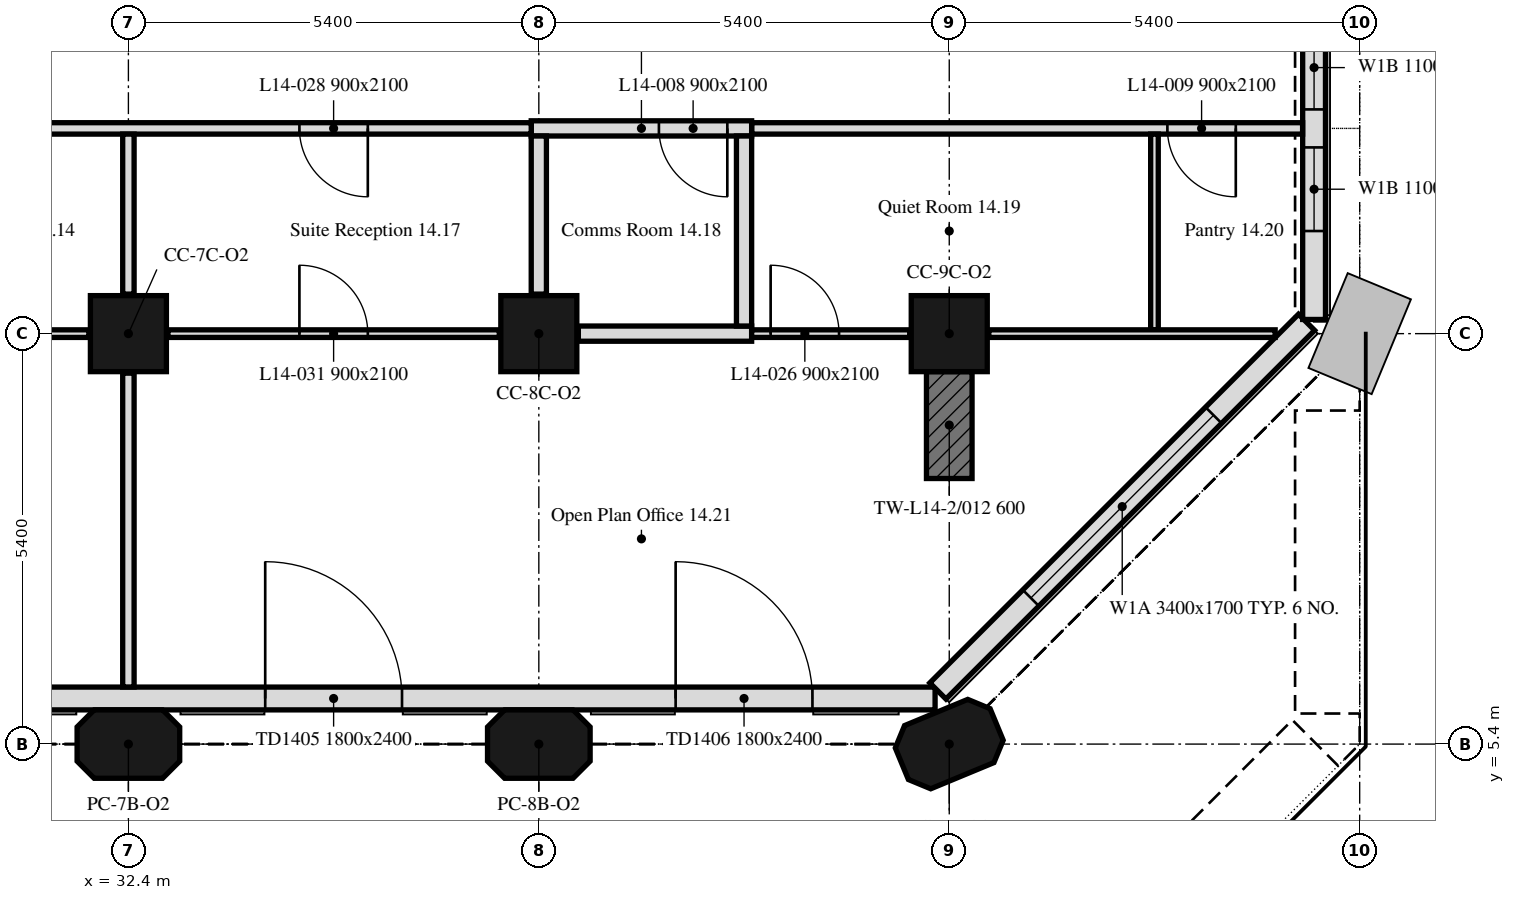
"""IFC4 building model, lengths in metres.
Left out: names, types, materials, properties, quantities, classifications, styles, units other than length and angle.
Written with IfcOpenShell. Run it as: python <this file> out.ifc"""

import sys

from ifc_helpers import new_model, si_unit, direction, frame, frame_2d, origin, origin_2d, place, context, subcontext, project, spatial, polyline, rectangle, outline, extrude, element, fill, save


model = new_model("IFC4")
c1 = context("Model", 3, precision=1e-05, world=origin(), true_north=direction((0.0, 1.0)))
c2 = subcontext(c1, "Body", "Model", "MODEL_VIEW")
j1 = project(units=[si_unit("LENGTHUNIT", "METRE"), si_unit("PLANEANGLEUNIT", "RADIAN")], contexts=[c1])
p1 = place(None, origin())
s1 = spatial("IfcSite", under=j1, at=p1, CompositionType="ELEMENT")
p2 = place(p1, origin())
s2 = spatial("IfcBuilding", under=s1, at=p2, CompositionType="ELEMENT")
p3 = place(p2, frame((0.0, 0.0, 65.0)))
s3 = spatial("IfcBuildingStorey", under=s2, at=p3, CompositionType="ELEMENT", Elevation=65.0)
for number, where, z_axis, x_axis in (
    (1, (32.4, 5.4, 0.0), (0.0, 0.0, 1.0), (1.0, 0.0, 0.0)),
    (2, (37.8, 5.4, 0.0), (0.0, 0.0, 1.0), (1.0, 0.0, 0.0)),
    (3, (43.2, 5.4, 0.0), (0.0, 0.0, 1.0), (0.924, 0.383, 0.0)),
):
    element("IfcColumn", number, at=place(p3, frame(where, z_axis=z_axis, x_axis=x_axis)), inside=s3, PredefinedType="COLUMN", context=c2, shape_type="SweptSolid", body=[
        extrude(outline(polyline([(-0.45, -0.45), (0.45, -0.45), (0.675, -0.225), (0.675, 0.225), (0.45, 0.45), (-0.45, 0.45), (-0.675, 0.225), (-0.675, -0.225), (-0.45, -0.45)])), origin(), (0.0, 0.0, 1.0), 3.5),
    ])
for number, where, z_axis, x_axis in (
    (4, (32.4, 10.8, 0.0), (0.0, 0.0, 1.0), (1.0, 0.0, 0.0)),
    (5, (37.8, 10.8, 0.0), (0.0, 0.0, 1.0), (1.0, 0.0, 0.0)),
    (6, (43.2, 10.8, 0.0), (0.0, 0.0, 1.0), (1.0, 0.0, 0.0)),
):
    element("IfcColumn", number, at=place(p3, frame(where, z_axis=z_axis, x_axis=x_axis)), inside=s3, PredefinedType="COLUMN", context=c2, shape_type="SweptSolid", body=[
        extrude(rectangle(XDim=1.0, YDim=1.0, at=origin_2d()), origin(), (0.0, 0.0, 1.0), 3.5),
    ])
p4 = place(p3, frame((43.2, 8.894, 0.0), z_axis=(0.0, 0.0, 1.0), x_axis=(0.0, 1.0, 0.0)))
e7 = element("IfcWall", 7, at=p4, inside=s3, PredefinedType="SHEAR", context=c2, shape_type="SweptSolid", body=[
    extrude(rectangle(XDim=1.406, YDim=0.6, at=frame_2d((0.703, 0.0))), origin(), (0.0, 0.0, 1.0), 3.5),
])
p5 = place(p3, frame((10.986, 6.0, 0.0), z_axis=(0.0, 0.0, 1.0), x_axis=(1.0, 0.0, 0.0)))
e8 = element("IfcWall", 8, at=p5, inside=s3, PredefinedType="SOLIDWALL", context=c2, shape_type="SweptSolid", body=[
    extrude(rectangle(XDim=32.027, YDim=0.3, at=frame_2d((16.014, 0.0))), origin(), (0.0, 0.0, 1.0), 3.5),
])
p6 = place(p5, frame((1.614, 0.0, 0.0)))
e9 = element("IfcOpeningElement", 9, at=p6, cuts=e8, PredefinedType="OPENING", context=c2, shape_type="SweptSolid", body=[
    extrude(rectangle(XDim=1.8, YDim=2.4, at=frame_2d((0.9, 1.2))), frame((0.0, 0.16, 0.0), z_axis=(0.0, -1.0, 0.0), x_axis=(1.0, 0.0, 0.0)), (0.0, 0.0, 1.0), 0.32),
])
p7 = place(p5, frame((7.014, 0.0, 0.0)))
e10 = element("IfcOpeningElement", 10, at=p7, cuts=e8, PredefinedType="OPENING", context=c2, shape_type="SweptSolid", body=[
    extrude(rectangle(XDim=1.8, YDim=2.4, at=frame_2d((0.9, 1.2))), frame((0.0, 0.16, 0.0), z_axis=(0.0, -1.0, 0.0), x_axis=(1.0, 0.0, 0.0)), (0.0, 0.0, 1.0), 0.32),
])
p8 = place(p5, frame((12.414, 0.0, 0.0)))
e11 = element("IfcOpeningElement", 11, at=p8, cuts=e8, PredefinedType="OPENING", context=c2, shape_type="SweptSolid", body=[
    extrude(rectangle(XDim=1.8, YDim=2.4, at=frame_2d((0.9, 1.2))), frame((0.0, 0.16, 0.0), z_axis=(0.0, -1.0, 0.0), x_axis=(1.0, 0.0, 0.0)), (0.0, 0.0, 1.0), 0.32),
])
p9 = place(p5, frame((17.814, 0.0, 0.0)))
e12 = element("IfcOpeningElement", 12, at=p9, cuts=e8, PredefinedType="OPENING", context=c2, shape_type="SweptSolid", body=[
    extrude(rectangle(XDim=1.8, YDim=2.4, at=frame_2d((0.9, 1.2))), frame((0.0, 0.16, 0.0), z_axis=(0.0, -1.0, 0.0), x_axis=(1.0, 0.0, 0.0)), (0.0, 0.0, 1.0), 0.32),
])
p10 = place(p5, frame((23.214, 0.0, 0.0)))
e13 = element("IfcOpeningElement", 13, at=p10, cuts=e8, PredefinedType="OPENING", context=c2, shape_type="SweptSolid", body=[
    extrude(rectangle(XDim=1.8, YDim=2.4, at=frame_2d((0.9, 1.2))), frame((0.0, 0.16, 0.0), z_axis=(0.0, -1.0, 0.0), x_axis=(1.0, 0.0, 0.0)), (0.0, 0.0, 1.0), 0.32),
])
p11 = place(p5, frame((28.614, 0.0, 0.0)))
e14 = element("IfcOpeningElement", 14, at=p11, cuts=e8, PredefinedType="OPENING", context=c2, shape_type="SweptSolid", body=[
    extrude(rectangle(XDim=1.8, YDim=2.4, at=frame_2d((0.9, 1.2))), frame((0.0, 0.16, 0.0), z_axis=(0.0, -1.0, 0.0), x_axis=(1.0, 0.0, 0.0)), (0.0, 0.0, 1.0), 0.32),
])
p12 = place(p3, frame((43.051, 6.099, 0.0), z_axis=(0.0, 0.0, 1.0), x_axis=(0.707106781187, 0.707106781187, 0.0)))
e15 = element("IfcWall", 15, at=p12, inside=s3, PredefinedType="SOLIDWALL", context=c2, shape_type="SweptSolid", body=[
    extrude(rectangle(XDim=6.86, YDim=0.3, at=frame_2d((3.43, 0.0))), origin(), (0.0, 0.0, 1.0), 3.5),
])
p13 = place(p12, frame((1.73, 0.0, 0.9)))
e16 = element("IfcOpeningElement", 16, at=p13, cuts=e15, PredefinedType="OPENING", context=c2, shape_type="SweptSolid", body=[
    extrude(rectangle(XDim=3.4, YDim=1.7, at=frame_2d((1.7, 0.85))), frame((0.0, 0.16, 0.0), z_axis=(0.0, -1.0, 0.0), x_axis=(1.0, 0.0, 0.0)), (0.0, 0.0, 1.0), 0.32),
])
p14 = place(p3, frame((48.0, 10.986, 0.0), z_axis=(0.0, 0.0, 1.0), x_axis=(0.0, 1.0, 0.0)))
e17 = element("IfcWall", 17, at=p14, inside=s3, PredefinedType="SOLIDWALL", context=c2, shape_type="SweptSolid", body=[
    extrude(rectangle(XDim=32.027, YDim=0.3, at=frame_2d((16.014, 0.0))), origin(), (0.0, 0.0, 1.0), 3.5),
])
p15 = place(p14, frame((1.164, 0.0, 0.9)))
e18 = element("IfcOpeningElement", 18, at=p15, cuts=e17, PredefinedType="OPENING", context=c2, shape_type="SweptSolid", body=[
    extrude(rectangle(XDim=1.1, YDim=1.7, at=frame_2d((0.55, 0.85))), frame((0.0, 0.16, 0.0), z_axis=(0.0, -1.0, 0.0), x_axis=(1.0, 0.0, 0.0)), (0.0, 0.0, 1.0), 0.32),
])
p16 = place(p14, frame((2.764, 0.0, 0.9)))
e19 = element("IfcOpeningElement", 19, at=p16, cuts=e17, PredefinedType="OPENING", context=c2, shape_type="SweptSolid", body=[
    extrude(rectangle(XDim=1.1, YDim=1.7, at=frame_2d((0.55, 0.85))), frame((0.0, 0.16, 0.0), z_axis=(0.0, -1.0, 0.0), x_axis=(1.0, 0.0, 0.0)), (0.0, 0.0, 1.0), 0.32),
])
p17 = place(p3, frame((47.849, 13.5, 0.0), z_axis=(0.0, 0.0, 1.0), x_axis=(-1.0, 0.0, 0.0)))
e20 = element("IfcWall", 20, at=p17, inside=s3, PredefinedType="PARTITIONING", context=c2, shape_type="SweptSolid", body=[
    extrude(rectangle(XDim=7.249, YDim=0.15, at=frame_2d((3.625, 0.0))), origin(), (0.0, 0.0, 1.0), 3.5),
])
p18 = place(p17, frame((0.879, 0.0, 0.0)))
e21 = element("IfcOpeningElement", 21, at=p18, cuts=e20, PredefinedType="OPENING", context=c2, shape_type="SweptSolid", body=[
    extrude(rectangle(XDim=0.9, YDim=2.1, at=frame_2d((0.45, 1.05))), frame((0.0, 0.075, 0.0), z_axis=(0.0, -1.0, 0.0), x_axis=(1.0, 0.0, 0.0)), (0.0, 0.0, 1.0), 0.15),
])
p19 = place(p3, frame((40.6, 13.5, 0.0), z_axis=(0.0, 0.0, 1.0), x_axis=(-1.0, 0.0, 0.0)))
e22 = element("IfcWall", 22, at=p19, inside=s3, PredefinedType="PARTITIONING", context=c2, shape_type="SweptSolid", body=[
    extrude(rectangle(XDim=2.9, YDim=0.2, at=frame_2d((1.45, 0.0))), origin(), (0.0, 0.0, 1.0), 3.5),
])
p20 = place(p19, frame((0.32, 0.0, 0.0)))
e23 = element("IfcOpeningElement", 23, at=p20, cuts=e22, PredefinedType="OPENING", context=c2, shape_type="SweptSolid", body=[
    extrude(rectangle(XDim=0.9, YDim=2.1, at=frame_2d((0.45, 1.05))), frame((0.0, 0.1, 0.0), z_axis=(0.0, -1.0, 0.0), x_axis=(1.0, 0.0, 0.0)), (0.0, 0.0, 1.0), 0.2),
])
p21 = place(p3, frame((37.7, 13.5, 0.0), z_axis=(0.0, 0.0, 1.0), x_axis=(-1.0, 0.0, 0.0)))
e24 = element("IfcWall", 24, at=p21, inside=s3, PredefinedType="PARTITIONING", context=c2, shape_type="SweptSolid", body=[
    extrude(rectangle(XDim=13.3, YDim=0.15, at=frame_2d((6.65, 0.0))), origin(), (0.0, 0.0, 1.0), 3.5),
])
p22 = place(p21, frame((2.15, 0.0, 0.0)))
e25 = element("IfcOpeningElement", 25, at=p22, cuts=e24, PredefinedType="OPENING", context=c2, shape_type="SweptSolid", body=[
    extrude(rectangle(XDim=0.9, YDim=2.1, at=frame_2d((0.45, 1.05))), frame((0.0, 0.075, 0.0), z_axis=(0.0, -1.0, 0.0), x_axis=(1.0, 0.0, 0.0)), (0.0, 0.0, 1.0), 0.15),
])
p23 = place(p21, frame((8.17, 0.0, 0.0)))
e26 = element("IfcOpeningElement", 26, at=p23, cuts=e24, PredefinedType="OPENING", context=c2, shape_type="SweptSolid", body=[
    extrude(rectangle(XDim=0.9, YDim=2.1, at=frame_2d((0.45, 1.05))), frame((0.0, 0.075, 0.0), z_axis=(0.0, -1.0, 0.0), x_axis=(1.0, 0.0, 0.0)), (0.0, 0.0, 1.0), 0.15),
])
p24 = place(p3, frame((27.52, 10.8, 0.0), z_axis=(0.0, 0.0, 1.0), x_axis=(1.0, 0.0, 0.0)))
e27 = element("IfcWall", 27, at=p24, inside=s3, PredefinedType="PARTITIONING", context=c2, shape_type="SweptSolid", body=[
    extrude(rectangle(XDim=4.36, YDim=0.1, at=frame_2d((2.18, 0.0))), origin(), (0.0, 0.0, 1.0), 3.5),
])
p25 = place(p3, frame((32.4, 11.32, 0.0), z_axis=(0.0, 0.0, 1.0), x_axis=(0.0, 1.0, 0.0)))
e28 = element("IfcWall", 28, at=p25, inside=s3, PredefinedType="PARTITIONING", context=c2, shape_type="SweptSolid", body=[
    extrude(rectangle(XDim=2.105, YDim=0.15, at=frame_2d((1.052, 0.0))), origin(), (0.0, 0.0, 1.0), 3.5),
])
p26 = place(p3, frame((32.4, 6.151, 0.0), z_axis=(0.0, 0.0, 1.0), x_axis=(0.0, 1.0, 0.0)))
e29 = element("IfcWall", 29, at=p26, inside=s3, PredefinedType="PARTITIONING", context=c2, shape_type="SweptSolid", body=[
    extrude(rectangle(XDim=4.129, YDim=0.15, at=frame_2d((2.064, 0.0))), origin(), (0.0, 0.0, 1.0), 3.5),
])
p27 = place(p3, frame((32.92, 10.8, 0.0), z_axis=(0.0, 0.0, 1.0), x_axis=(1.0, 0.0, 0.0)))
e30 = element("IfcWall", 30, at=p27, inside=s3, PredefinedType="PARTITIONING", context=c2, shape_type="SweptSolid", body=[
    extrude(rectangle(XDim=4.36, YDim=0.1, at=frame_2d((2.18, 0.0))), origin(), (0.0, 0.0, 1.0), 3.5),
])
p28 = place(p27, frame((1.73, 0.0, 0.0)))
e31 = element("IfcOpeningElement", 31, at=p28, cuts=e30, PredefinedType="OPENING", context=c2, shape_type="SweptSolid", body=[
    extrude(rectangle(XDim=0.9, YDim=2.1, at=frame_2d((0.45, 1.05))), frame((0.0, 0.05, 0.0), z_axis=(0.0, -1.0, 0.0), x_axis=(1.0, 0.0, 0.0)), (0.0, 0.0, 1.0), 0.1),
])
p29 = place(p3, frame((37.8, 11.32, 0.0), z_axis=(0.0, 0.0, 1.0), x_axis=(0.0, 1.0, 0.0)))
e32 = element("IfcWall", 32, at=p29, inside=s3, PredefinedType="PARTITIONING", context=c2, shape_type="SweptSolid", body=[
    extrude(rectangle(XDim=2.08, YDim=0.2, at=frame_2d((1.04, 0.0))), origin(), (0.0, 0.0, 1.0), 3.5),
])
p30 = place(p3, frame((38.32, 10.8, 0.0), z_axis=(0.0, 0.0, 1.0), x_axis=(1.0, 0.0, 0.0)))
e33 = element("IfcWall", 33, at=p30, inside=s3, PredefinedType="PARTITIONING", context=c2, shape_type="SweptSolid", body=[
    extrude(rectangle(XDim=2.28, YDim=0.2, at=frame_2d((1.14, 0.0))), origin(), (0.0, 0.0, 1.0), 3.5),
])
p31 = place(p3, frame((40.5, 10.9, 0.0), z_axis=(0.0, 0.0, 1.0), x_axis=(0.0, 1.0, 0.0)))
e34 = element("IfcWall", 34, at=p31, inside=s3, PredefinedType="PARTITIONING", context=c2, shape_type="SweptSolid", body=[
    extrude(rectangle(XDim=2.5, YDim=0.2, at=frame_2d((1.25, 0.0))), origin(), (0.0, 0.0, 1.0), 3.5),
])
p32 = place(p3, frame((40.6, 10.8, 0.0), z_axis=(0.0, 0.0, 1.0), x_axis=(1.0, 0.0, 0.0)))
e35 = element("IfcWall", 35, at=p32, inside=s3, PredefinedType="PARTITIONING", context=c2, shape_type="SweptSolid", body=[
    extrude(rectangle(XDim=2.08, YDim=0.1, at=frame_2d((1.04, 0.0))), origin(), (0.0, 0.0, 1.0), 3.5),
])
p33 = place(p32, frame((0.25, 0.0, 0.0)))
e36 = element("IfcOpeningElement", 36, at=p33, cuts=e35, PredefinedType="OPENING", context=c2, shape_type="SweptSolid", body=[
    extrude(rectangle(XDim=0.9, YDim=2.1, at=frame_2d((0.45, 1.05))), frame((0.0, 0.05, 0.0), z_axis=(0.0, -1.0, 0.0), x_axis=(1.0, 0.0, 0.0)), (0.0, 0.0, 1.0), 0.1),
])
p34 = place(p3, frame((45.9, 10.85, 0.0), z_axis=(0.0, 0.0, 1.0), x_axis=(0.0, 1.0, 0.0)))
e37 = element("IfcWall", 37, at=p34, inside=s3, PredefinedType="PARTITIONING", context=c2, shape_type="SweptSolid", body=[
    extrude(rectangle(XDim=2.575, YDim=0.1, at=frame_2d((1.288, 0.0))), origin(), (0.0, 0.0, 1.0), 3.5),
])
p35 = place(p3, frame((43.72, 10.8, 0.0), z_axis=(0.0, 0.0, 1.0), x_axis=(1.0, 0.0, 0.0)))
e38 = element("IfcWall", 38, at=p35, inside=s3, PredefinedType="PARTITIONING", context=c2, shape_type="SweptSolid", body=[
    extrude(rectangle(XDim=3.768, YDim=0.1, at=frame_2d((1.884, 0.0))), origin(), (0.0, 0.0, 1.0), 3.5),
])
p36 = place(p10, origin())
e39 = element("IfcDoor", 39, at=p36, inside=s3, OperationType="DOUBLE_DOOR_DOUBLE_SWING", PredefinedType="DOOR", context=c2, shape_type="SweptSolid", body=[
    extrude(rectangle(XDim=1.8, YDim=2.4, at=frame_2d((0.9, 1.2))), frame((0.0, 0.025, 0.0), z_axis=(0.0, -1.0, 0.0), x_axis=(1.0, 0.0, 0.0)), (0.0, 0.0, 1.0), 0.05),
])
fill(e13, e39)
p37 = place(p11, origin())
e40 = element("IfcDoor", 40, at=p37, inside=s3, OperationType="DOUBLE_DOOR_DOUBLE_SWING", PredefinedType="DOOR", context=c2, shape_type="SweptSolid", body=[
    extrude(rectangle(XDim=1.8, YDim=2.4, at=frame_2d((0.9, 1.2))), frame((0.0, 0.025, 0.0), z_axis=(0.0, -1.0, 0.0), x_axis=(1.0, 0.0, 0.0)), (0.0, 0.0, 1.0), 0.05),
])
fill(e14, e40)
p38 = place(p13, origin())
e41 = element("IfcWindow", 41, at=p38, inside=s3, PartitioningType="SINGLE_PANEL", PredefinedType="WINDOW", context=c2, shape_type="SweptSolid", body=[
    extrude(rectangle(XDim=3.4, YDim=1.7, at=frame_2d((1.7, 0.85))), frame((0.0, 0.03, 0.0), z_axis=(0.0, -1.0, 0.0), x_axis=(1.0, 0.0, 0.0)), (0.0, 0.0, 1.0), 0.06),
])
fill(e16, e41)
p39 = place(p15, origin())
e42 = element("IfcWindow", 42, at=p39, inside=s3, PartitioningType="SINGLE_PANEL", PredefinedType="WINDOW", context=c2, shape_type="SweptSolid", body=[
    extrude(rectangle(XDim=1.1, YDim=1.7, at=frame_2d((0.55, 0.85))), frame((0.0, 0.03, 0.0), z_axis=(0.0, -1.0, 0.0), x_axis=(1.0, 0.0, 0.0)), (0.0, 0.0, 1.0), 0.06),
])
fill(e18, e42)
p40 = place(p16, origin())
e43 = element("IfcWindow", 43, at=p40, inside=s3, PartitioningType="SINGLE_PANEL", PredefinedType="WINDOW", context=c2, shape_type="SweptSolid", body=[
    extrude(rectangle(XDim=1.1, YDim=1.7, at=frame_2d((0.55, 0.85))), frame((0.0, 0.03, 0.0), z_axis=(0.0, -1.0, 0.0), x_axis=(1.0, 0.0, 0.0)), (0.0, 0.0, 1.0), 0.06),
])
fill(e19, e43)
p41 = place(p20, origin())
e44 = element("IfcDoor", 44, at=p41, inside=s3, OperationType="SINGLE_SWING_LEFT", PredefinedType="DOOR", context=c2, shape_type="SweptSolid", body=[
    extrude(rectangle(XDim=0.9, YDim=2.1, at=frame_2d((0.45, 1.05))), frame((0.0, 0.025, 0.0), z_axis=(0.0, -1.0, 0.0), x_axis=(1.0, 0.0, 0.0)), (0.0, 0.0, 1.0), 0.05),
])
fill(e23, e44)
p42 = place(p18, origin())
e45 = element("IfcDoor", 45, at=p42, inside=s3, OperationType="SINGLE_SWING_LEFT", PredefinedType="DOOR", context=c2, shape_type="SweptSolid", body=[
    extrude(rectangle(XDim=0.9, YDim=2.1, at=frame_2d((0.45, 1.05))), frame((0.0, 0.025, 0.0), z_axis=(0.0, -1.0, 0.0), x_axis=(1.0, 0.0, 0.0)), (0.0, 0.0, 1.0), 0.05),
])
fill(e21, e45)
p43 = place(p33, origin())
e46 = element("IfcDoor", 46, at=p43, inside=s3, OperationType="SINGLE_SWING_LEFT", PredefinedType="DOOR", context=c2, shape_type="SweptSolid", body=[
    extrude(rectangle(XDim=0.9, YDim=2.1, at=frame_2d((0.45, 1.05))), frame((0.0, 0.025, 0.0), z_axis=(0.0, -1.0, 0.0), x_axis=(1.0, 0.0, 0.0)), (0.0, 0.0, 1.0), 0.05),
])
fill(e36, e46)
p44 = place(p22, origin())
e47 = element("IfcDoor", 47, at=p44, inside=s3, OperationType="SINGLE_SWING_LEFT", PredefinedType="DOOR", context=c2, shape_type="SweptSolid", body=[
    extrude(rectangle(XDim=0.9, YDim=2.1, at=frame_2d((0.45, 1.05))), frame((0.0, 0.025, 0.0), z_axis=(0.0, -1.0, 0.0), x_axis=(1.0, 0.0, 0.0)), (0.0, 0.0, 1.0), 0.05),
])
fill(e25, e47)
p45 = place(p28, origin())
e48 = element("IfcDoor", 48, at=p45, inside=s3, OperationType="SINGLE_SWING_RIGHT", PredefinedType="DOOR", context=c2, shape_type="SweptSolid", body=[
    extrude(rectangle(XDim=0.9, YDim=2.1, at=frame_2d((0.45, 1.05))), frame((0.0, 0.025, 0.0), z_axis=(0.0, -1.0, 0.0), x_axis=(1.0, 0.0, 0.0)), (0.0, 0.0, 1.0), 0.05),
])
fill(e31, e48)
save(model, sys.argv[1])
